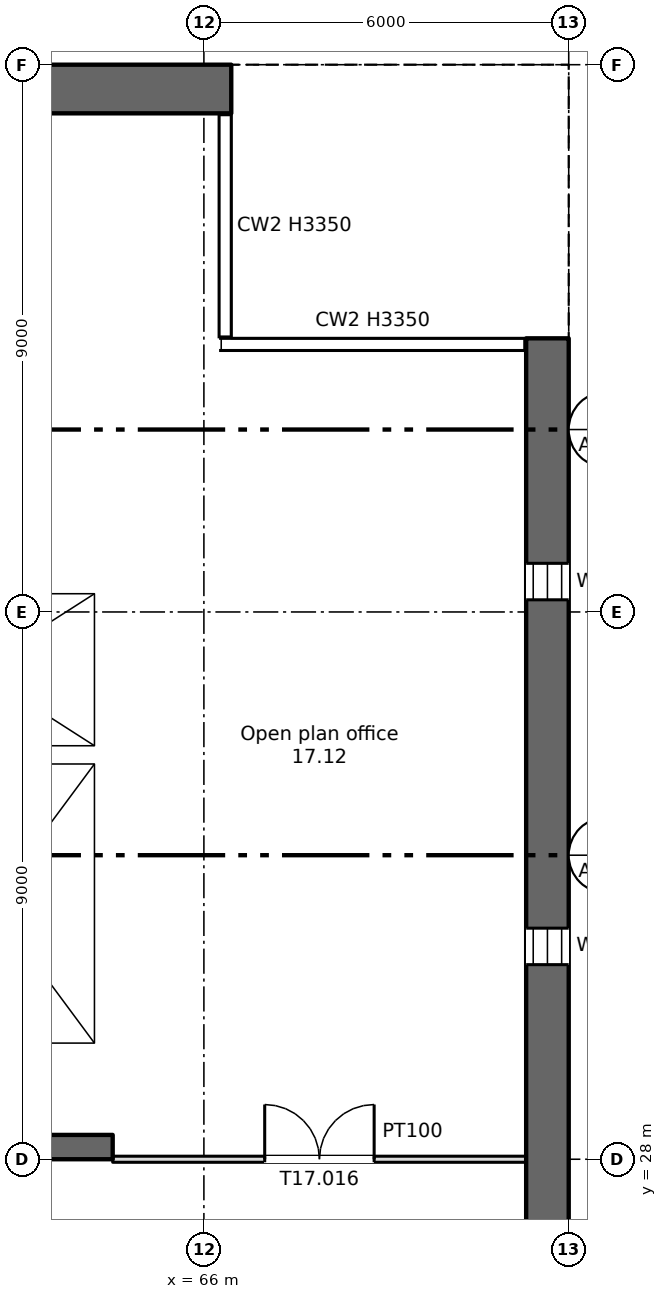
"""IFC4 building model, lengths in metres.
Left out: names, types, materials, properties, quantities, classifications, styles, units other than length and angle.
Written with IfcOpenShell. Run it as: python <this file> out.ifc"""

import sys

from ifc_helpers import new_model, si_unit, direction, frame, frame_2d, origin, place, context, subcontext, project, spatial, rectangle, extrude, element, fill, save


model = new_model("IFC4")
c1 = context("Model", 3, precision=1e-05, world=origin(), true_north=direction((0.0, 1.0)))
c2 = subcontext(c1, "Body", "Model", "MODEL_VIEW")
j1 = project(units=[si_unit("LENGTHUNIT", "METRE"), si_unit("PLANEANGLEUNIT", "RADIAN")], contexts=[c1])
p1 = place(None, origin())
s1 = spatial("IfcSite", under=j1, at=p1, CompositionType="ELEMENT")
p2 = place(p1, origin())
s2 = spatial("IfcBuilding", under=s1, at=p2, CompositionType="ELEMENT")
p3 = place(p2, frame((0.0, 0.0, 110.0)))
s3 = spatial("IfcBuildingStorey", under=s2, at=p3, CompositionType="ELEMENT", Elevation=110.0)
p4 = place(p3, frame((71.65, 6.0, 0.0), z_axis=(0.0, 0.0, 1.0), x_axis=(0.0, 1.0, 0.0)))
e1 = element("IfcWall", 1, at=p4, inside=s3, PredefinedType="SHEAR", context=c2, shape_type="SweptSolid", body=[
    extrude(rectangle(XDim=35.5, YDim=0.7, at=frame_2d((17.75, 0.0))), origin(), (0.0, 0.0, 1.0), 3.35),
])
p5 = place(p4, frame((1.2, 0.0, 0.6)))
e2 = element("IfcOpeningElement", 2, at=p5, cuts=e1, PredefinedType="OPENING", context=c2, shape_type="SweptSolid", body=[
    extrude(rectangle(XDim=0.6, YDim=2.4, at=frame_2d((0.3, 1.2))), frame((0.0, 0.36, 0.0), z_axis=(0.0, -1.0, 0.0), x_axis=(1.0, 0.0, 0.0)), (0.0, 0.0, 1.0), 0.72),
])
p6 = place(p4, frame((7.2, 0.0, 0.6)))
e3 = element("IfcOpeningElement", 3, at=p6, cuts=e1, PredefinedType="OPENING", context=c2, shape_type="SweptSolid", body=[
    extrude(rectangle(XDim=0.6, YDim=2.4, at=frame_2d((0.3, 1.2))), frame((0.0, 0.36, 0.0), z_axis=(0.0, -1.0, 0.0), x_axis=(1.0, 0.0, 0.0)), (0.0, 0.0, 1.0), 0.72),
])
p7 = place(p4, frame((13.2, 0.0, 0.6)))
e4 = element("IfcOpeningElement", 4, at=p7, cuts=e1, PredefinedType="OPENING", context=c2, shape_type="SweptSolid", body=[
    extrude(rectangle(XDim=0.6, YDim=2.4, at=frame_2d((0.3, 1.2))), frame((0.0, 0.36, 0.0), z_axis=(0.0, -1.0, 0.0), x_axis=(1.0, 0.0, 0.0)), (0.0, 0.0, 1.0), 0.72),
])
p8 = place(p4, frame((19.2, 0.0, 0.6)))
e5 = element("IfcOpeningElement", 5, at=p8, cuts=e1, PredefinedType="OPENING", context=c2, shape_type="SweptSolid", body=[
    extrude(rectangle(XDim=0.6, YDim=2.4, at=frame_2d((0.3, 1.2))), frame((0.0, 0.36, 0.0), z_axis=(0.0, -1.0, 0.0), x_axis=(1.0, 0.0, 0.0)), (0.0, 0.0, 1.0), 0.72),
])
p9 = place(p4, frame((25.2, 0.0, 0.6)))
e6 = element("IfcOpeningElement", 6, at=p9, cuts=e1, PredefinedType="OPENING", context=c2, shape_type="SweptSolid", body=[
    extrude(rectangle(XDim=0.6, YDim=2.4, at=frame_2d((0.3, 1.2))), frame((0.0, 0.36, 0.0), z_axis=(0.0, -1.0, 0.0), x_axis=(1.0, 0.0, 0.0)), (0.0, 0.0, 1.0), 0.72),
])
p10 = place(p4, frame((31.2, 0.0, 0.6)))
e7 = element("IfcOpeningElement", 7, at=p10, cuts=e1, PredefinedType="OPENING", context=c2, shape_type="SweptSolid", body=[
    extrude(rectangle(XDim=0.6, YDim=2.4, at=frame_2d((0.3, 1.2))), frame((0.0, 0.36, 0.0), z_axis=(0.0, -1.0, 0.0), x_axis=(1.0, 0.0, 0.0)), (0.0, 0.0, 1.0), 0.72),
])
p11 = place(p3, frame((5.55, 45.6, 0.0), z_axis=(0.0, 0.0, 1.0), x_axis=(1.0, 0.0, 0.0)))
e8 = element("IfcWall", 8, at=p11, inside=s3, PredefinedType="SHEAR", context=c2, shape_type="SweptSolid", body=[
    extrude(rectangle(XDim=60.9, YDim=0.8, at=frame_2d((30.45, 0.0))), origin(), (0.0, 0.0, 1.0), 3.35),
])
p12 = place(p11, frame((1.2, 0.0, 0.6)))
e9 = element("IfcOpeningElement", 9, at=p12, cuts=e8, PredefinedType="OPENING", context=c2, shape_type="SweptSolid", body=[
    extrude(rectangle(XDim=0.6, YDim=2.4, at=frame_2d((0.3, 1.2))), frame((0.0, 0.41, 0.0), z_axis=(0.0, -1.0, 0.0), x_axis=(1.0, 0.0, 0.0)), (0.0, 0.0, 1.0), 0.82),
])
p13 = place(p11, frame((7.2, 0.0, 0.6)))
e10 = element("IfcOpeningElement", 10, at=p13, cuts=e8, PredefinedType="OPENING", context=c2, shape_type="SweptSolid", body=[
    extrude(rectangle(XDim=0.6, YDim=2.4, at=frame_2d((0.3, 1.2))), frame((0.0, 0.41, 0.0), z_axis=(0.0, -1.0, 0.0), x_axis=(1.0, 0.0, 0.0)), (0.0, 0.0, 1.0), 0.82),
])
p14 = place(p3, frame((6.7, 28.2, 0.0), z_axis=(0.0, 0.0, 1.0), x_axis=(1.0, 0.0, 0.0)))
e11 = element("IfcWall", 11, at=p14, inside=s3, PredefinedType="SHEAR", context=c2, shape_type="SweptSolid", body=[
    extrude(rectangle(XDim=57.8, YDim=0.4, at=frame_2d((28.9, 0.0))), origin(), (0.0, 0.0, 1.0), 3.35),
])
p15 = place(p14, frame((12.562, 0.0, 0.0)))
e12 = element("IfcOpeningElement", 12, at=p15, cuts=e11, PredefinedType="OPENING", context=c2, shape_type="SweptSolid", body=[
    extrude(rectangle(XDim=0.9, YDim=2.1, at=frame_2d((0.45, 1.05))), frame((0.0, 0.21, 0.0), z_axis=(0.0, -1.0, 0.0), x_axis=(1.0, 0.0, 0.0)), (0.0, 0.0, 1.0), 0.42),
])
p16 = place(p14, frame((15.137, 0.0, 0.0)))
e13 = element("IfcOpeningElement", 13, at=p16, cuts=e11, PredefinedType="OPENING", context=c2, shape_type="SweptSolid", body=[
    extrude(rectangle(XDim=0.9, YDim=2.1, at=frame_2d((0.45, 1.05))), frame((0.0, 0.21, 0.0), z_axis=(0.0, -1.0, 0.0), x_axis=(1.0, 0.0, 0.0)), (0.0, 0.0, 1.0), 0.42),
])
p17 = place(p14, frame((49.85, 0.0, 0.0)))
e14 = element("IfcOpeningElement", 14, at=p17, cuts=e11, PredefinedType="OPENING", context=c2, shape_type="SweptSolid", body=[
    extrude(rectangle(XDim=0.9, YDim=2.1, at=frame_2d((0.45, 1.05))), frame((0.0, 0.21, 0.0), z_axis=(0.0, -1.0, 0.0), x_axis=(1.0, 0.0, 0.0)), (0.0, 0.0, 1.0), 0.42),
])
p18 = place(p14, frame((0.562, 0.0, 0.0)))
e15 = element("IfcOpeningElement", 15, at=p18, cuts=e11, PredefinedType="OPENING", context=c2, shape_type="SweptSolid", body=[
    extrude(rectangle(XDim=0.9, YDim=2.1, at=frame_2d((0.45, 1.05))), frame((0.0, 0.21, 0.0), z_axis=(0.0, -1.0, 0.0), x_axis=(1.0, 0.0, 0.0)), (0.0, 0.0, 1.0), 0.42),
])
p19 = place(p14, frame((2.137, 0.0, 0.0)))
e16 = element("IfcOpeningElement", 16, at=p19, cuts=e11, PredefinedType="OPENING", context=c2, shape_type="SweptSolid", body=[
    extrude(rectangle(XDim=0.9, YDim=2.1, at=frame_2d((0.45, 1.05))), frame((0.0, 0.21, 0.0), z_axis=(0.0, -1.0, 0.0), x_axis=(1.0, 0.0, 0.0)), (0.0, 0.0, 1.0), 0.42),
])
p20 = place(p14, frame((4.7, 0.0, 0.0)))
e17 = element("IfcOpeningElement", 17, at=p20, cuts=e11, PredefinedType="OPENING", context=c2, shape_type="SweptSolid", body=[
    extrude(rectangle(XDim=1.2, YDim=2.1, at=frame_2d((0.6, 1.05))), frame((0.0, 0.21, 0.0), z_axis=(0.0, -1.0, 0.0), x_axis=(1.0, 0.0, 0.0)), (0.0, 0.0, 1.0), 0.42),
])
p21 = place(p14, frame((31.7, 0.0, 0.0)))
e18 = element("IfcOpeningElement", 18, at=p21, cuts=e11, PredefinedType="OPENING", context=c2, shape_type="SweptSolid", body=[
    extrude(rectangle(XDim=1.2, YDim=2.1, at=frame_2d((0.6, 1.05))), frame((0.0, 0.21, 0.0), z_axis=(0.0, -1.0, 0.0), x_axis=(1.0, 0.0, 0.0)), (0.0, 0.0, 1.0), 0.42),
])
p22 = place(p14, frame((55.2, 0.0, 0.0)))
e19 = element("IfcOpeningElement", 19, at=p22, cuts=e11, PredefinedType="OPENING", context=c2, shape_type="SweptSolid", body=[
    extrude(rectangle(XDim=1.2, YDim=2.1, at=frame_2d((0.6, 1.05))), frame((0.0, 0.21, 0.0), z_axis=(0.0, -1.0, 0.0), x_axis=(1.0, 0.0, 0.0)), (0.0, 0.0, 1.0), 0.42),
])
p23 = place(p14, frame((21.7, 0.0, 0.0)))
e20 = element("IfcOpeningElement", 20, at=p23, cuts=e11, PredefinedType="OPENING", context=c2, shape_type="SweptSolid", body=[
    extrude(rectangle(XDim=1.2, YDim=2.1, at=frame_2d((0.6, 1.05))), frame((0.0, 0.21, 0.0), z_axis=(0.0, -1.0, 0.0), x_axis=(1.0, 0.0, 0.0)), (0.0, 0.0, 1.0), 0.42),
])
p24 = place(p14, frame((41.7, 0.0, 0.0)))
e21 = element("IfcOpeningElement", 21, at=p24, cuts=e11, PredefinedType="OPENING", context=c2, shape_type="SweptSolid", body=[
    extrude(rectangle(XDim=1.2, YDim=2.1, at=frame_2d((0.6, 1.05))), frame((0.0, 0.21, 0.0), z_axis=(0.0, -1.0, 0.0), x_axis=(1.0, 0.0, 0.0)), (0.0, 0.0, 1.0), 0.42),
])
p25 = place(p14, frame((24.85, 0.0, 0.0)))
e22 = element("IfcOpeningElement", 22, at=p25, cuts=e11, PredefinedType="OPENING", context=c2, shape_type="SweptSolid", body=[
    extrude(rectangle(XDim=2.4, YDim=2.1, at=frame_2d((1.2, 1.05))), frame((0.0, 0.21, 0.0), z_axis=(0.0, -1.0, 0.0), x_axis=(1.0, 0.0, 0.0)), (0.0, 0.0, 1.0), 0.42),
])
p26 = place(p14, frame((37.35, 0.0, 0.0)))
e23 = element("IfcOpeningElement", 23, at=p26, cuts=e11, PredefinedType="OPENING", context=c2, shape_type="SweptSolid", body=[
    extrude(rectangle(XDim=2.4, YDim=2.1, at=frame_2d((1.2, 1.05))), frame((0.0, 0.21, 0.0), z_axis=(0.0, -1.0, 0.0), x_axis=(1.0, 0.0, 0.0)), (0.0, 0.0, 1.0), 0.42),
])
p27 = place(p14, frame((7.95, 0.0, 0.0)))
e24 = element("IfcOpeningElement", 24, at=p27, cuts=e11, PredefinedType="OPENING", context=c2, shape_type="SweptSolid", body=[
    extrude(rectangle(XDim=2.4, YDim=2.1, at=frame_2d((1.2, 1.05))), frame((0.0, 0.21, 0.0), z_axis=(0.0, -1.0, 0.0), x_axis=(1.0, 0.0, 0.0)), (0.0, 0.0, 1.0), 0.42),
])
p28 = place(p14, frame((28.85, 0.0, 0.0)))
e25 = element("IfcOpeningElement", 25, at=p28, cuts=e11, PredefinedType="OPENING", context=c2, shape_type="SweptSolid", body=[
    extrude(rectangle(XDim=0.9, YDim=2.1, at=frame_2d((0.45, 1.05))), frame((0.0, 0.21, 0.0), z_axis=(0.0, -1.0, 0.0), x_axis=(1.0, 0.0, 0.0)), (0.0, 0.0, 1.0), 0.42),
])
p29 = place(p14, frame((34.85, 0.0, 0.0)))
e26 = element("IfcOpeningElement", 26, at=p29, cuts=e11, PredefinedType="OPENING", context=c2, shape_type="SweptSolid", body=[
    extrude(rectangle(XDim=0.9, YDim=2.1, at=frame_2d((0.45, 1.05))), frame((0.0, 0.21, 0.0), z_axis=(0.0, -1.0, 0.0), x_axis=(1.0, 0.0, 0.0)), (0.0, 0.0, 1.0), 0.42),
])
p30 = place(p3, frame((64.35, 34.8, 0.0), z_axis=(0.0, 0.0, 1.0), x_axis=(0.0, 1.0, 0.0)))
e27 = element("IfcWall", 27, at=p30, inside=s3, PredefinedType="SHEAR", context=c2, shape_type="SweptSolid", body=[
    extrude(rectangle(XDim=10.4, YDim=0.3, at=frame_2d((5.2, 0.0))), origin(), (0.0, 0.0, 1.0), 3.35),
])
p31 = place(p3, frame((64.35, 28.4, 0.0), z_axis=(0.0, 0.0, 1.0), x_axis=(0.0, 1.0, 0.0)))
e28 = element("IfcWall", 28, at=p31, inside=s3, PredefinedType="SHEAR", context=c2, shape_type="SweptSolid", body=[
    extrude(rectangle(XDim=6.1, YDim=0.3, at=frame_2d((3.05, 0.0))), origin(), (0.0, 0.0, 1.0), 3.35),
])
p32 = place(p3, frame((60.3, 34.65, 0.0), z_axis=(0.0, 0.0, 1.0), x_axis=(1.0, 0.0, 0.0)))
e29 = element("IfcWall", 29, at=p32, inside=s3, PredefinedType="SHEAR", context=c2, shape_type="SweptSolid", body=[
    extrude(rectangle(XDim=4.2, YDim=0.3, at=frame_2d((2.1, 0.0))), origin(), (0.0, 0.0, 1.0), 3.35),
])
p33 = place(p3, frame((60.3, 37.45, 0.0), z_axis=(0.0, 0.0, 1.0), x_axis=(1.0, 0.0, 0.0)))
e30 = element("IfcWall", 30, at=p33, inside=s3, PredefinedType="SHEAR", context=c2, shape_type="SweptSolid", body=[
    extrude(rectangle(XDim=3.9, YDim=0.3, at=frame_2d((1.95, 0.0))), origin(), (0.0, 0.0, 1.0), 3.35),
])
p34 = place(p33, frame((1.4, 0.0, 0.0)))
e31 = element("IfcOpeningElement", 31, at=p34, cuts=e30, PredefinedType="OPENING", context=c2, shape_type="SweptSolid", body=[
    extrude(rectangle(XDim=1.1, YDim=2.1, at=frame_2d((0.55, 1.05))), frame((0.0, 0.16, 0.0), z_axis=(0.0, -1.0, 0.0), x_axis=(1.0, 0.0, 0.0)), (0.0, 0.0, 1.0), 0.32),
])
p35 = place(p3, frame((64.5, 28.0, 0.0), z_axis=(0.0, 0.0, 1.0), x_axis=(1.0, 0.0, 0.0)))
e32 = element("IfcWall", 32, at=p35, inside=s3, PredefinedType="PARTITIONING", context=c2, shape_type="SweptSolid", body=[
    extrude(rectangle(XDim=6.8, YDim=0.1, at=frame_2d((3.4, 0.0))), origin(), (0.0, 0.0, 1.0), 3.35),
])
p36 = place(p35, frame((2.5, 0.0, 0.0)))
e33 = element("IfcOpeningElement", 33, at=p36, cuts=e32, PredefinedType="OPENING", context=c2, shape_type="SweptSolid", body=[
    extrude(rectangle(XDim=1.8, YDim=2.1, at=frame_2d((0.9, 1.05))), frame((0.0, 0.06, 0.0), z_axis=(0.0, -1.0, 0.0), x_axis=(1.0, 0.0, 0.0)), (0.0, 0.0, 1.0), 0.12),
])
p37 = place(p9, origin())
e34 = element("IfcWindow", 34, at=p37, inside=s3, PartitioningType="SINGLE_PANEL", PredefinedType="WINDOW", context=c2, shape_type="SweptSolid", body=[
    extrude(rectangle(XDim=0.6, YDim=2.4, at=frame_2d((0.3, 1.2))), frame((0.0, 0.03, 0.0), z_axis=(0.0, -1.0, 0.0), x_axis=(1.0, 0.0, 0.0)), (0.0, 0.0, 1.0), 0.06),
])
fill(e6, e34)
p38 = place(p10, origin())
e35 = element("IfcWindow", 35, at=p38, inside=s3, PartitioningType="SINGLE_PANEL", PredefinedType="WINDOW", context=c2, shape_type="SweptSolid", body=[
    extrude(rectangle(XDim=0.6, YDim=2.4, at=frame_2d((0.3, 1.2))), frame((0.0, 0.03, 0.0), z_axis=(0.0, -1.0, 0.0), x_axis=(1.0, 0.0, 0.0)), (0.0, 0.0, 1.0), 0.06),
])
fill(e7, e35)
p39 = place(p36, origin())
e36 = element("IfcDoor", 36, at=p39, inside=s3, OperationType="DOUBLE_DOOR_SINGLE_SWING", PredefinedType="DOOR", context=c2, shape_type="SweptSolid", body=[
    extrude(rectangle(XDim=1.8, YDim=2.1, at=frame_2d((0.9, 1.05))), frame((0.0, 0.025, 0.0), z_axis=(0.0, -1.0, 0.0), x_axis=(1.0, 0.0, 0.0)), (0.0, 0.0, 1.0), 0.05),
])
fill(e33, e36)
save(model, sys.argv[1])
